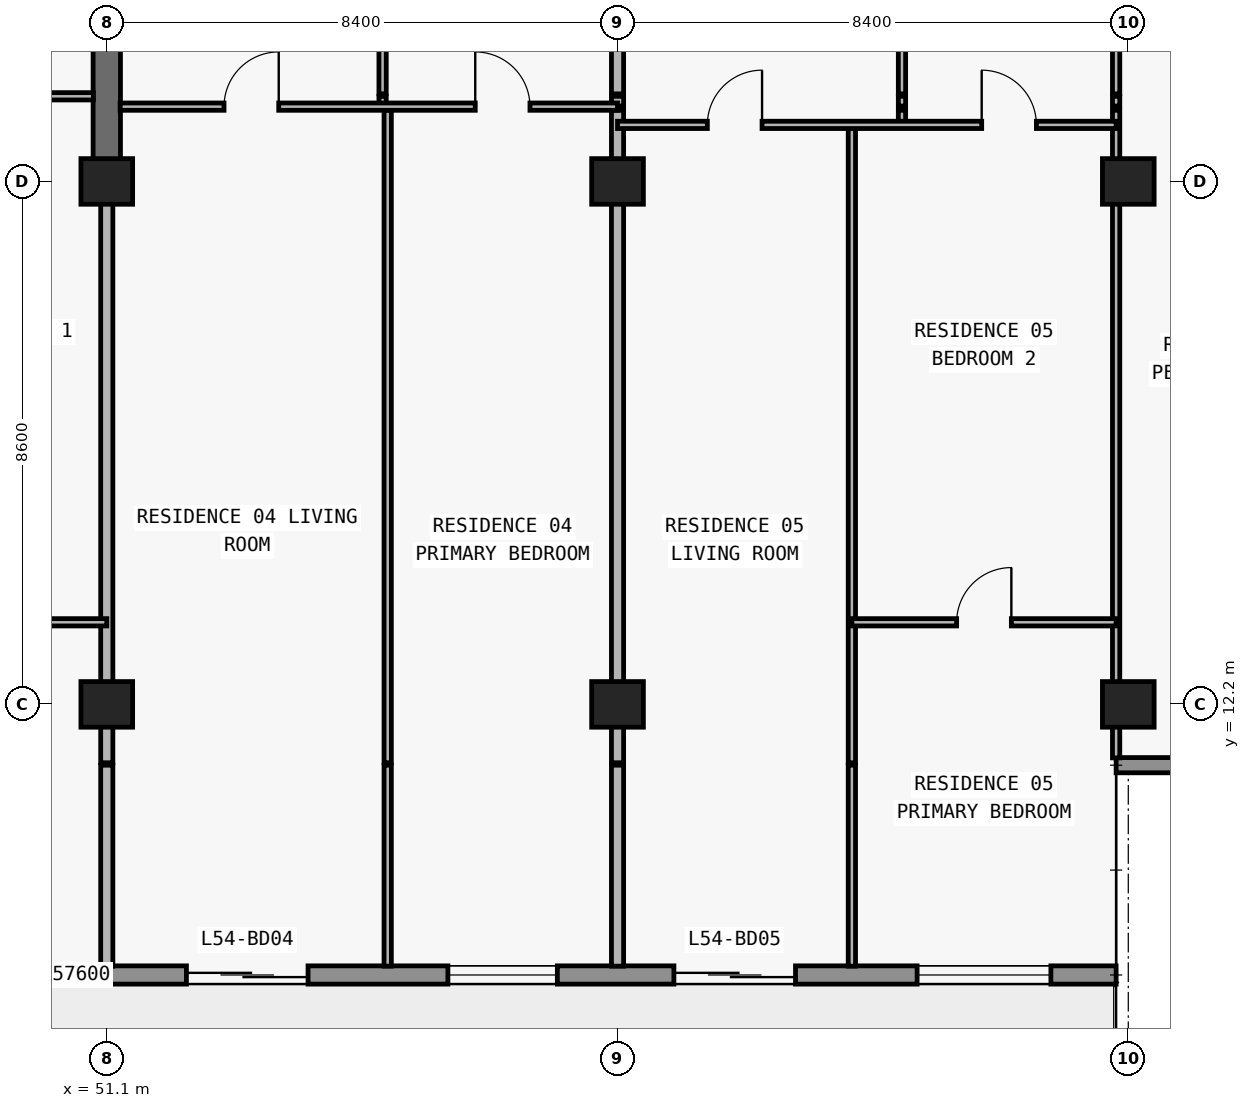
"""IFC4 building model, lengths in metres.
Left out: names, types, materials, properties, quantities, classifications, styles, units other than length and angle.
Written with IfcOpenShell. Run it as: python <this file> out.ifc"""

import sys

from ifc_helpers import new_model, si_unit, direction, frame, frame_2d, origin, origin_2d, place, context, subcontext, project, spatial, rectangle, extrude, element, fill, save


model = new_model("IFC4")
c1 = context("Model", 3, precision=1e-05, world=origin(), true_north=direction((0.0, 1.0)))
c2 = subcontext(c1, "Body", "Model", "MODEL_VIEW")
j1 = project(units=[si_unit("LENGTHUNIT", "METRE"), si_unit("PLANEANGLEUNIT", "RADIAN")], contexts=[c1])
p1 = place(None, origin())
s1 = spatial("IfcSite", under=j1, at=p1, CompositionType="ELEMENT")
p2 = place(p1, origin())
s2 = spatial("IfcBuilding", under=s1, at=p2, CompositionType="ELEMENT")
p3 = place(p2, frame((0.0, 0.0, 195.0)))
s3 = spatial("IfcBuildingStorey", under=s2, at=p3, CompositionType="ELEMENT", Elevation=195.0)
for number, where, z_axis, x_axis in (
    (1, (51.1, 12.2, 0.0), (0.0, 0.0, 1.0), (1.0, 0.0, 0.0)),
    (2, (59.5, 12.2, 0.0), (0.0, 0.0, 1.0), (1.0, 0.0, 0.0)),
    (3, (67.9, 12.2, 0.0), (0.0, 0.0, 1.0), (1.0, 0.0, 0.0)),
    (4, (51.1, 20.8, 0.0), (0.0, 0.0, 1.0), (1.0, 0.0, 0.0)),
    (5, (59.5, 20.8, 0.0), (0.0, 0.0, 1.0), (1.0, 0.0, 0.0)),
    (6, (67.9, 20.8, 0.0), (0.0, 0.0, 1.0), (1.0, 0.0, 0.0)),
):
    element("IfcColumn", number, at=place(p3, frame(where, z_axis=z_axis, x_axis=x_axis)), inside=s3, PredefinedType="COLUMN", context=c2, shape_type="SweptSolid", body=[
        extrude(rectangle(XDim=0.85, YDim=0.75, at=origin_2d()), origin(), (0.0, 0.0, 1.0), 3.05),
    ])
p4 = place(p3, frame((51.1, 20.8, 0.0), z_axis=(0.0, 0.0, 1.0), x_axis=(0.0, 1.0, 0.0)))
e7 = element("IfcWall", 7, at=p4, inside=s3, PredefinedType="SHEAR", context=c2, shape_type="SweptSolid", body=[
    extrude(rectangle(XDim=8.6, YDim=0.45, at=frame_2d((4.3, 0.0))), origin(), (0.0, 0.0, 1.0), 3.05),
])
p5 = place(p3, frame((67.7, 7.75, 0.0), z_axis=(0.0, 0.0, 1.0), x_axis=(-1.0, 0.0, 0.0)))
e8 = element("IfcWall", 8, at=p5, inside=s3, PredefinedType="STANDARD", context=c2, shape_type="SweptSolid", body=[
    extrude(rectangle(XDim=57.6, YDim=0.3, at=frame_2d((28.8, 0.0))), origin(), (0.0, 0.0, 1.0), 3.05),
])
p6 = place(p5, frame((54.69, 0.0, 0.0)))
e9 = element("IfcOpeningElement", 9, at=p6, cuts=e8, PredefinedType="OPENING", context=c2, shape_type="SweptSolid", body=[
    extrude(rectangle(XDim=2.0, YDim=2.3, at=frame_2d((1.0, 1.15))), frame((0.0, 0.16, 0.0), z_axis=(0.0, -1.0, 0.0), x_axis=(1.0, 0.0, 0.0)), (0.0, 0.0, 1.0), 0.32),
])
p7 = place(p5, frame((50.21, 0.0, 0.65)))
e10 = element("IfcOpeningElement", 10, at=p7, cuts=e8, PredefinedType="OPENING", context=c2, shape_type="SweptSolid", body=[
    extrude(rectangle(XDim=2.6, YDim=1.85, at=frame_2d((1.3, 0.925))), frame((0.0, 0.16, 0.0), z_axis=(0.0, -1.0, 0.0), x_axis=(1.0, 0.0, 0.0)), (0.0, 0.0, 1.0), 0.32),
])
p8 = place(p5, frame((44.1, 0.0, 0.85)))
e11 = element("IfcOpeningElement", 11, at=p8, cuts=e8, PredefinedType="OPENING", context=c2, shape_type="SweptSolid", body=[
    extrude(rectangle(XDim=2.2, YDim=1.55, at=frame_2d((1.1, 0.775))), frame((0.0, 0.16, 0.0), z_axis=(0.0, -1.0, 0.0), x_axis=(1.0, 0.0, 0.0)), (0.0, 0.0, 1.0), 0.32),
])
p9 = place(p5, frame((37.69, 0.0, 0.0)))
e12 = element("IfcOpeningElement", 12, at=p9, cuts=e8, PredefinedType="OPENING", context=c2, shape_type="SweptSolid", body=[
    extrude(rectangle(XDim=2.0, YDim=2.3, at=frame_2d((1.0, 1.15))), frame((0.0, 0.16, 0.0), z_axis=(0.0, -1.0, 0.0), x_axis=(1.0, 0.0, 0.0)), (0.0, 0.0, 1.0), 0.32),
])
p10 = place(p5, frame((33.59, 0.0, 0.85)))
e13 = element("IfcOpeningElement", 13, at=p10, cuts=e8, PredefinedType="OPENING", context=c2, shape_type="SweptSolid", body=[
    extrude(rectangle(XDim=1.8, YDim=1.55, at=frame_2d((0.9, 0.775))), frame((0.0, 0.16, 0.0), z_axis=(0.0, -1.0, 0.0), x_axis=(1.0, 0.0, 0.0)), (0.0, 0.0, 1.0), 0.32),
])
p11 = place(p5, frame((29.69, 0.0, 0.0)))
e14 = element("IfcOpeningElement", 14, at=p11, cuts=e8, PredefinedType="OPENING", context=c2, shape_type="SweptSolid", body=[
    extrude(rectangle(XDim=2.0, YDim=2.3, at=frame_2d((1.0, 1.15))), frame((0.0, 0.16, 0.0), z_axis=(0.0, -1.0, 0.0), x_axis=(1.0, 0.0, 0.0)), (0.0, 0.0, 1.0), 0.32),
])
p12 = place(p5, frame((25.81, 0.0, 0.65)))
e15 = element("IfcOpeningElement", 15, at=p12, cuts=e8, PredefinedType="OPENING", context=c2, shape_type="SweptSolid", body=[
    extrude(rectangle(XDim=2.6, YDim=1.85, at=frame_2d((1.3, 0.925))), frame((0.0, 0.16, 0.0), z_axis=(0.0, -1.0, 0.0), x_axis=(1.0, 0.0, 0.0)), (0.0, 0.0, 1.0), 0.32),
])
p13 = place(p5, frame((19.7, 0.0, 0.85)))
e16 = element("IfcOpeningElement", 16, at=p13, cuts=e8, PredefinedType="OPENING", context=c2, shape_type="SweptSolid", body=[
    extrude(rectangle(XDim=2.2, YDim=1.55, at=frame_2d((1.1, 0.775))), frame((0.0, 0.16, 0.0), z_axis=(0.0, -1.0, 0.0), x_axis=(1.0, 0.0, 0.0)), (0.0, 0.0, 1.0), 0.32),
])
p14 = place(p5, frame((13.29, 0.0, 0.0)))
e17 = element("IfcOpeningElement", 17, at=p14, cuts=e8, PredefinedType="OPENING", context=c2, shape_type="SweptSolid", body=[
    extrude(rectangle(XDim=2.0, YDim=2.3, at=frame_2d((1.0, 1.15))), frame((0.0, 0.16, 0.0), z_axis=(0.0, -1.0, 0.0), x_axis=(1.0, 0.0, 0.0)), (0.0, 0.0, 1.0), 0.32),
])
p15 = place(p5, frame((9.19, 0.0, 0.85)))
e18 = element("IfcOpeningElement", 18, at=p15, cuts=e8, PredefinedType="OPENING", context=c2, shape_type="SweptSolid", body=[
    extrude(rectangle(XDim=1.8, YDim=1.55, at=frame_2d((0.9, 0.775))), frame((0.0, 0.16, 0.0), z_axis=(0.0, -1.0, 0.0), x_axis=(1.0, 0.0, 0.0)), (0.0, 0.0, 1.0), 0.32),
])
p16 = place(p5, frame((5.273, 0.0, 0.0)))
e19 = element("IfcOpeningElement", 19, at=p16, cuts=e8, PredefinedType="OPENING", context=c2, shape_type="SweptSolid", body=[
    extrude(rectangle(XDim=2.0, YDim=2.3, at=frame_2d((1.0, 1.15))), frame((0.0, 0.16, 0.0), z_axis=(0.0, -1.0, 0.0), x_axis=(1.0, 0.0, 0.0)), (0.0, 0.0, 1.0), 0.32),
])
p17 = place(p5, frame((1.073, 0.0, 0.85)))
e20 = element("IfcOpeningElement", 20, at=p17, cuts=e8, PredefinedType="OPENING", context=c2, shape_type="SweptSolid", body=[
    extrude(rectangle(XDim=2.2, YDim=1.55, at=frame_2d((1.1, 0.775))), frame((0.0, 0.16, 0.0), z_axis=(0.0, -1.0, 0.0), x_axis=(1.0, 0.0, 0.0)), (0.0, 0.0, 1.0), 0.32),
])
p18 = place(p3, frame((67.7, 11.2, 0.0), z_axis=(0.0, 0.0, 1.0), x_axis=(1.0, 0.0, 0.0)))
e21 = element("IfcWall", 21, at=p18, inside=s3, PredefinedType="ELEMENTEDWALL", context=c2, shape_type="SweptSolid", body=[
    extrude(rectangle(XDim=3.85, YDim=0.25, at=frame_2d((1.925, 0.0))), origin(), (0.0, 0.0, 1.0), 3.05),
])
p19 = place(p3, frame((51.1, 7.895, 0.0), z_axis=(0.0, 0.0, 1.0), x_axis=(0.0, 1.0, 0.0)))
e22 = element("IfcWall", 22, at=p19, inside=s3, PredefinedType="PARTITIONING", context=c2, shape_type="SweptSolid", body=[
    extrude(rectangle(XDim=3.305, YDim=0.2, at=frame_2d((1.652, 0.0))), origin(), (0.0, 0.0, 1.0), 3.05),
])
p20 = place(p3, frame((51.1, 11.24, 0.0), z_axis=(0.0, 0.0, 1.0), x_axis=(0.0, 1.0, 0.0)))
e23 = element("IfcWall", 23, at=p20, inside=s3, PredefinedType="PARTITIONING", context=c2, shape_type="SweptSolid", body=[
    extrude(rectangle(XDim=9.555, YDim=0.2, at=frame_2d((4.777, 0.0))), origin(), (0.0, 0.0, 1.0), 2.263),
])
p21 = place(p3, frame((55.636, 22.04, 0.0), z_axis=(0.0, 0.0, 1.0), x_axis=(0.0, 1.0, 0.0)))
e24 = element("IfcWall", 24, at=p21, inside=s3, PredefinedType="PARTITIONING", context=c2, shape_type="SweptSolid", body=[
    extrude(rectangle(XDim=0.16, YDim=0.12, at=frame_2d((0.08, 0.0))), origin(), (0.0, 0.0, 1.0), 3.05),
])
p22 = place(p3, frame((55.636, 22.24, 0.0), z_axis=(0.0, 0.0, 1.0), x_axis=(0.0, 1.0, 0.0)))
e25 = element("IfcWall", 25, at=p22, inside=s3, PredefinedType="PARTITIONING", context=c2, shape_type="SweptSolid", body=[
    extrude(rectangle(XDim=4.36, YDim=0.12, at=frame_2d((2.18, 0.0))), origin(), (0.0, 0.0, 1.0), 3.05),
])
p23 = place(p22, frame((1.73, 0.0, 0.0)))
e26 = element("IfcOpeningElement", 26, at=p23, cuts=e25, PredefinedType="OPENING", context=c2, shape_type="SweptSolid", body=[
    extrude(rectangle(XDim=0.9, YDim=2.15, at=frame_2d((0.45, 1.075))), frame((0.0, 0.07, 0.0), z_axis=(0.0, -1.0, 0.0), x_axis=(1.0, 0.0, 0.0)), (0.0, 0.0, 1.0), 0.14),
])
p24 = place(p3, frame((55.72, 7.895, 0.0), z_axis=(0.0, 0.0, 1.0), x_axis=(0.0, 1.0, 0.0)))
e27 = element("IfcWall", 27, at=p24, inside=s3, PredefinedType="PARTITIONING", context=c2, shape_type="SweptSolid", body=[
    extrude(rectangle(XDim=3.305, YDim=0.12, at=frame_2d((1.652, 0.0))), origin(), (0.0, 0.0, 1.0), 3.05),
])
p25 = place(p3, frame((55.72, 11.24, 0.0), z_axis=(0.0, 0.0, 1.0), x_axis=(0.0, 1.0, 0.0)))
e28 = element("IfcWall", 28, at=p25, inside=s3, PredefinedType="PARTITIONING", context=c2, shape_type="SweptSolid", body=[
    extrude(rectangle(XDim=10.73, YDim=0.12, at=frame_2d((5.365, 0.0))), origin(), (0.0, 0.0, 1.0), 3.05),
])
p26 = place(p3, frame((59.5, 7.895, 0.0), z_axis=(0.0, 0.0, 1.0), x_axis=(0.0, 1.0, 0.0)))
e29 = element("IfcWall", 29, at=p26, inside=s3, PredefinedType="PARTITIONING", context=c2, shape_type="SweptSolid", body=[
    extrude(rectangle(XDim=3.305, YDim=0.2, at=frame_2d((1.652, 0.0))), origin(), (0.0, 0.0, 1.0), 3.05),
])
p27 = place(p3, frame((59.5, 11.24, 0.0), z_axis=(0.0, 0.0, 1.0), x_axis=(0.0, 1.0, 0.0)))
e30 = element("IfcWall", 30, at=p27, inside=s3, PredefinedType="PARTITIONING", context=c2, shape_type="SweptSolid", body=[
    extrude(rectangle(XDim=10.73, YDim=0.2, at=frame_2d((5.365, 0.0))), origin(), (0.0, 0.0, 1.0), 2.263),
])
p28 = place(p3, frame((59.5, 22.04, 0.0), z_axis=(0.0, 0.0, 1.0), x_axis=(0.0, 1.0, 0.0)))
e31 = element("IfcWall", 31, at=p28, inside=s3, PredefinedType="PARTITIONING", context=c2, shape_type="SweptSolid", body=[
    extrude(rectangle(XDim=0.16, YDim=0.2, at=frame_2d((0.08, 0.0))), origin(), (0.0, 0.0, 1.0), 2.263),
])
p29 = place(p3, frame((59.5, 22.24, 0.0), z_axis=(0.0, 0.0, 1.0), x_axis=(0.0, 1.0, 0.0)))
e32 = element("IfcWall", 32, at=p29, inside=s3, PredefinedType="PARTITIONING", context=c2, shape_type="SweptSolid", body=[
    extrude(rectangle(XDim=4.36, YDim=0.2, at=frame_2d((2.18, 0.0))), origin(), (0.0, 0.0, 1.0), 2.263),
])
p30 = place(p3, frame((63.354, 7.895, 0.0), z_axis=(0.0, 0.0, 1.0), x_axis=(0.0, 1.0, 0.0)))
e33 = element("IfcWall", 33, at=p30, inside=s3, PredefinedType="PARTITIONING", context=c2, shape_type="SweptSolid", body=[
    extrude(rectangle(XDim=3.305, YDim=0.12, at=frame_2d((1.652, 0.0))), origin(), (0.0, 0.0, 1.0), 3.05),
])
p31 = place(p3, frame((63.354, 11.24, 0.0), z_axis=(0.0, 0.0, 1.0), x_axis=(0.0, 1.0, 0.0)))
e34 = element("IfcWall", 34, at=p31, inside=s3, PredefinedType="PARTITIONING", context=c2, shape_type="SweptSolid", body=[
    extrude(rectangle(XDim=10.49, YDim=0.12, at=frame_2d((5.245, 0.0))), origin(), (0.0, 0.0, 1.0), 3.05),
])
p32 = place(p3, frame((64.178, 21.73, 0.0), z_axis=(0.0, 0.0, 1.0), x_axis=(0.0, 1.0, 0.0)))
e35 = element("IfcWall", 35, at=p32, inside=s3, PredefinedType="PARTITIONING", context=c2, shape_type="SweptSolid", body=[
    extrude(rectangle(XDim=0.24, YDim=0.12, at=frame_2d((0.12, 0.0))), origin(), (0.0, 0.0, 1.0), 3.05),
])
p33 = place(p3, frame((64.178, 22.04, 0.0), z_axis=(0.0, 0.0, 1.0), x_axis=(0.0, 1.0, 0.0)))
e36 = element("IfcWall", 36, at=p33, inside=s3, PredefinedType="PARTITIONING", context=c2, shape_type="SweptSolid", body=[
    extrude(rectangle(XDim=0.16, YDim=0.12, at=frame_2d((0.08, 0.0))), origin(), (0.0, 0.0, 1.0), 3.05),
])
p34 = place(p3, frame((64.178, 22.24, 0.0), z_axis=(0.0, 0.0, 1.0), x_axis=(0.0, 1.0, 0.0)))
e37 = element("IfcWall", 37, at=p34, inside=s3, PredefinedType="PARTITIONING", context=c2, shape_type="SweptSolid", body=[
    extrude(rectangle(XDim=4.36, YDim=0.12, at=frame_2d((2.18, 0.0))), origin(), (0.0, 0.0, 1.0), 3.05),
])
p35 = place(p34, frame((1.73, 0.0, 0.0)))
e38 = element("IfcOpeningElement", 38, at=p35, cuts=e37, PredefinedType="OPENING", context=c2, shape_type="SweptSolid", body=[
    extrude(rectangle(XDim=0.9, YDim=2.15, at=frame_2d((0.45, 1.075))), frame((0.0, 0.07, 0.0), z_axis=(0.0, -1.0, 0.0), x_axis=(1.0, 0.0, 0.0)), (0.0, 0.0, 1.0), 0.14),
])
p36 = place(p3, frame((67.7, 11.32, 0.0), z_axis=(0.0, 0.0, 1.0), x_axis=(0.0, 1.0, 0.0)))
e39 = element("IfcWall", 39, at=p36, inside=s3, PredefinedType="PARTITIONING", context=c2, shape_type="SweptSolid", body=[
    extrude(rectangle(XDim=10.65, YDim=0.12, at=frame_2d((5.325, 0.0))), origin(), (0.0, 0.0, 1.0), 2.263),
])
p37 = place(p3, frame((67.7, 22.04, 0.0), z_axis=(0.0, 0.0, 1.0), x_axis=(0.0, 1.0, 0.0)))
e40 = element("IfcWall", 40, at=p37, inside=s3, PredefinedType="PARTITIONING", context=c2, shape_type="SweptSolid", body=[
    extrude(rectangle(XDim=0.16, YDim=0.12, at=frame_2d((0.08, 0.0))), origin(), (0.0, 0.0, 1.0), 2.263),
])
p38 = place(p3, frame((67.7, 22.24, 0.0), z_axis=(0.0, 0.0, 1.0), x_axis=(0.0, 1.0, 0.0)))
e41 = element("IfcWall", 41, at=p38, inside=s3, PredefinedType="PARTITIONING", context=c2, shape_type="SweptSolid", body=[
    extrude(rectangle(XDim=4.36, YDim=0.12, at=frame_2d((2.18, 0.0))), origin(), (0.0, 0.0, 1.0), 2.263),
])
p39 = place(p38, frame((1.73, 0.0, 0.0)))
e42 = element("IfcOpeningElement", 42, at=p39, cuts=e41, PredefinedType="OPENING", context=c2, shape_type="SweptSolid", body=[
    extrude(rectangle(XDim=0.9, YDim=2.15, at=frame_2d((0.45, 1.075))), frame((0.0, 0.07, 0.0), z_axis=(0.0, -1.0, 0.0), x_axis=(1.0, 0.0, 0.0)), (0.0, 0.0, 1.0), 0.14),
])
p40 = place(p3, frame((42.7, 13.55, 0.0), z_axis=(0.0, 0.0, 1.0), x_axis=(1.0, 0.0, 0.0)))
e43 = element("IfcWall", 43, at=p40, inside=s3, PredefinedType="PARTITIONING", context=c2, shape_type="SweptSolid", body=[
    extrude(rectangle(XDim=8.4, YDim=0.12, at=frame_2d((4.2, 0.0))), origin(), (0.0, 0.0, 1.0), 3.05),
])
p41 = place(p40, frame((3.75, 0.0, 0.0)))
e44 = element("IfcOpeningElement", 44, at=p41, cuts=e43, PredefinedType="OPENING", context=c2, shape_type="SweptSolid", body=[
    extrude(rectangle(XDim=0.9, YDim=2.15, at=frame_2d((0.45, 1.075))), frame((0.0, 0.07, 0.0), z_axis=(0.0, -1.0, 0.0), x_axis=(1.0, 0.0, 0.0)), (0.0, 0.0, 1.0), 0.14),
])
p42 = place(p3, frame((63.354, 13.55, 0.0), z_axis=(0.0, 0.0, 1.0), x_axis=(1.0, 0.0, 0.0)))
e45 = element("IfcWall", 45, at=p42, inside=s3, PredefinedType="PARTITIONING", context=c2, shape_type="SweptSolid", body=[
    extrude(rectangle(XDim=4.346, YDim=0.12, at=frame_2d((2.173, 0.0))), origin(), (0.0, 0.0, 1.0), 3.05),
])
p43 = place(p42, frame((1.723, 0.0, 0.0)))
e46 = element("IfcOpeningElement", 46, at=p43, cuts=e45, PredefinedType="OPENING", context=c2, shape_type="SweptSolid", body=[
    extrude(rectangle(XDim=0.9, YDim=2.15, at=frame_2d((0.45, 1.075))), frame((0.0, 0.07, 0.0), z_axis=(0.0, -1.0, 0.0), x_axis=(1.0, 0.0, 0.0)), (0.0, 0.0, 1.0), 0.14),
])
p44 = place(p3, frame((59.5, 21.73, 0.0), z_axis=(0.0, 0.0, 1.0), x_axis=(1.0, 0.0, 0.0)))
e47 = element("IfcWall", 47, at=p44, inside=s3, PredefinedType="PARTITIONING", context=c2, shape_type="SweptSolid", body=[
    extrude(rectangle(XDim=8.2, YDim=0.12, at=frame_2d((4.1, 0.0))), origin(), (0.0, 0.0, 1.0), 3.05),
])
p45 = place(p44, frame((1.477, 0.0, 0.0)))
e48 = element("IfcOpeningElement", 48, at=p45, cuts=e47, PredefinedType="OPENING", context=c2, shape_type="SweptSolid", body=[
    extrude(rectangle(XDim=0.9, YDim=2.15, at=frame_2d((0.45, 1.075))), frame((0.0, 0.07, 0.0), z_axis=(0.0, -1.0, 0.0), x_axis=(1.0, 0.0, 0.0)), (0.0, 0.0, 1.0), 0.14),
])
p46 = place(p44, frame((5.989, 0.0, 0.0)))
e49 = element("IfcOpeningElement", 49, at=p46, cuts=e47, PredefinedType="OPENING", context=c2, shape_type="SweptSolid", body=[
    extrude(rectangle(XDim=0.9, YDim=2.15, at=frame_2d((0.45, 1.075))), frame((0.0, 0.07, 0.0), z_axis=(0.0, -1.0, 0.0), x_axis=(1.0, 0.0, 0.0)), (0.0, 0.0, 1.0), 0.14),
])
p47 = place(p3, frame((51.32, 22.03, 0.0), z_axis=(0.0, 0.0, 1.0), x_axis=(1.0, 0.0, 0.0)))
e50 = element("IfcWall", 50, at=p47, inside=s3, PredefinedType="PARTITIONING", context=c2, shape_type="SweptSolid", body=[
    extrude(rectangle(XDim=8.18, YDim=0.12, at=frame_2d((4.09, 0.0))), origin(), (0.0, 0.0, 1.0), 3.05),
])
p48 = place(p47, frame((1.708, 0.0, 0.0)))
e51 = element("IfcOpeningElement", 51, at=p48, cuts=e50, PredefinedType="OPENING", context=c2, shape_type="SweptSolid", body=[
    extrude(rectangle(XDim=0.9, YDim=2.15, at=frame_2d((0.45, 1.075))), frame((0.0, 0.07, 0.0), z_axis=(0.0, -1.0, 0.0), x_axis=(1.0, 0.0, 0.0)), (0.0, 0.0, 1.0), 0.14),
])
p49 = place(p47, frame((5.84, 0.0, 0.0)))
e52 = element("IfcOpeningElement", 52, at=p49, cuts=e50, PredefinedType="OPENING", context=c2, shape_type="SweptSolid", body=[
    extrude(rectangle(XDim=0.9, YDim=2.15, at=frame_2d((0.45, 1.075))), frame((0.0, 0.07, 0.0), z_axis=(0.0, -1.0, 0.0), x_axis=(1.0, 0.0, 0.0)), (0.0, 0.0, 1.0), 0.14),
])
p50 = place(p3, frame((42.705, 22.2, 0.0), z_axis=(0.0, 0.0, 1.0), x_axis=(1.0, 0.0, 0.0)))
e53 = element("IfcWall", 53, at=p50, inside=s3, PredefinedType="PARTITIONING", context=c2, shape_type="SweptSolid", body=[
    extrude(rectangle(XDim=8.175, YDim=0.12, at=frame_2d((4.087, 0.0))), origin(), (0.0, 0.0, 1.0), 3.05),
])
p51 = place(p50, frame((3.637, 0.0, 0.0)))
e54 = element("IfcOpeningElement", 54, at=p51, cuts=e53, PredefinedType="OPENING", context=c2, shape_type="SweptSolid", body=[
    extrude(rectangle(XDim=0.9, YDim=2.15, at=frame_2d((0.45, 1.075))), frame((0.0, 0.07, 0.0), z_axis=(0.0, -1.0, 0.0), x_axis=(1.0, 0.0, 0.0)), (0.0, 0.0, 1.0), 0.14),
])
p52 = place(p14, origin())
e55 = element("IfcDoor", 55, at=p52, inside=s3, OperationType="DOUBLE_DOOR_SLIDING", PredefinedType="DOOR", context=c2, shape_type="SweptSolid", body=[
    extrude(rectangle(XDim=2.0, YDim=2.3, at=frame_2d((1.0, 1.15))), frame((0.0, 0.025, 0.0), z_axis=(0.0, -1.0, 0.0), x_axis=(1.0, 0.0, 0.0)), (0.0, 0.0, 1.0), 0.05),
])
fill(e17, e55)
p53 = place(p15, origin())
e56 = element("IfcWindow", 56, at=p53, inside=s3, PartitioningType="SINGLE_PANEL", PredefinedType="WINDOW", context=c2, shape_type="SweptSolid", body=[
    extrude(rectangle(XDim=1.8, YDim=1.55, at=frame_2d((0.9, 0.775))), frame((0.0, 0.03, 0.0), z_axis=(0.0, -1.0, 0.0), x_axis=(1.0, 0.0, 0.0)), (0.0, 0.0, 1.0), 0.06),
])
fill(e18, e56)
p54 = place(p16, origin())
e57 = element("IfcDoor", 57, at=p54, inside=s3, OperationType="DOUBLE_DOOR_SLIDING", PredefinedType="DOOR", context=c2, shape_type="SweptSolid", body=[
    extrude(rectangle(XDim=2.0, YDim=2.3, at=frame_2d((1.0, 1.15))), frame((0.0, 0.025, 0.0), z_axis=(0.0, -1.0, 0.0), x_axis=(1.0, 0.0, 0.0)), (0.0, 0.0, 1.0), 0.05),
])
fill(e19, e57)
p55 = place(p17, origin())
e58 = element("IfcWindow", 58, at=p55, inside=s3, PartitioningType="SINGLE_PANEL", PredefinedType="WINDOW", context=c2, shape_type="SweptSolid", body=[
    extrude(rectangle(XDim=2.2, YDim=1.55, at=frame_2d((1.1, 0.775))), frame((0.0, 0.03, 0.0), z_axis=(0.0, -1.0, 0.0), x_axis=(1.0, 0.0, 0.0)), (0.0, 0.0, 1.0), 0.06),
])
fill(e20, e58)
p56 = place(p48, origin())
e59 = element("IfcDoor", 59, at=p56, inside=s3, OperationType="SINGLE_SWING_RIGHT", PredefinedType="DOOR", context=c2, shape_type="SweptSolid", body=[
    extrude(rectangle(XDim=0.9, YDim=2.15, at=frame_2d((0.45, 1.075))), frame((0.0, 0.025, 0.0), z_axis=(0.0, -1.0, 0.0), x_axis=(1.0, 0.0, 0.0)), (0.0, 0.0, 1.0), 0.05),
])
fill(e51, e59)
p57 = place(p49, origin())
e60 = element("IfcDoor", 60, at=p57, inside=s3, OperationType="SINGLE_SWING_LEFT", PredefinedType="DOOR", context=c2, shape_type="SweptSolid", body=[
    extrude(rectangle(XDim=0.9, YDim=2.15, at=frame_2d((0.45, 1.075))), frame((0.0, 0.025, 0.0), z_axis=(0.0, -1.0, 0.0), x_axis=(1.0, 0.0, 0.0)), (0.0, 0.0, 1.0), 0.05),
])
fill(e52, e60)
p58 = place(p45, origin())
e61 = element("IfcDoor", 61, at=p58, inside=s3, OperationType="SINGLE_SWING_RIGHT", PredefinedType="DOOR", context=c2, shape_type="SweptSolid", body=[
    extrude(rectangle(XDim=0.9, YDim=2.15, at=frame_2d((0.45, 1.075))), frame((0.0, 0.025, 0.0), z_axis=(0.0, -1.0, 0.0), x_axis=(1.0, 0.0, 0.0)), (0.0, 0.0, 1.0), 0.05),
])
fill(e48, e61)
p59 = place(p46, origin())
e62 = element("IfcDoor", 62, at=p59, inside=s3, OperationType="SINGLE_SWING_LEFT", PredefinedType="DOOR", context=c2, shape_type="SweptSolid", body=[
    extrude(rectangle(XDim=0.9, YDim=2.15, at=frame_2d((0.45, 1.075))), frame((0.0, 0.025, 0.0), z_axis=(0.0, -1.0, 0.0), x_axis=(1.0, 0.0, 0.0)), (0.0, 0.0, 1.0), 0.05),
])
fill(e49, e62)
p60 = place(p43, origin())
e63 = element("IfcDoor", 63, at=p60, inside=s3, OperationType="SINGLE_SWING_RIGHT", PredefinedType="DOOR", context=c2, shape_type="SweptSolid", body=[
    extrude(rectangle(XDim=0.9, YDim=2.15, at=frame_2d((0.45, 1.075))), frame((0.0, 0.025, 0.0), z_axis=(0.0, -1.0, 0.0), x_axis=(1.0, 0.0, 0.0)), (0.0, 0.0, 1.0), 0.05),
])
fill(e46, e63)
save(model, sys.argv[1])
